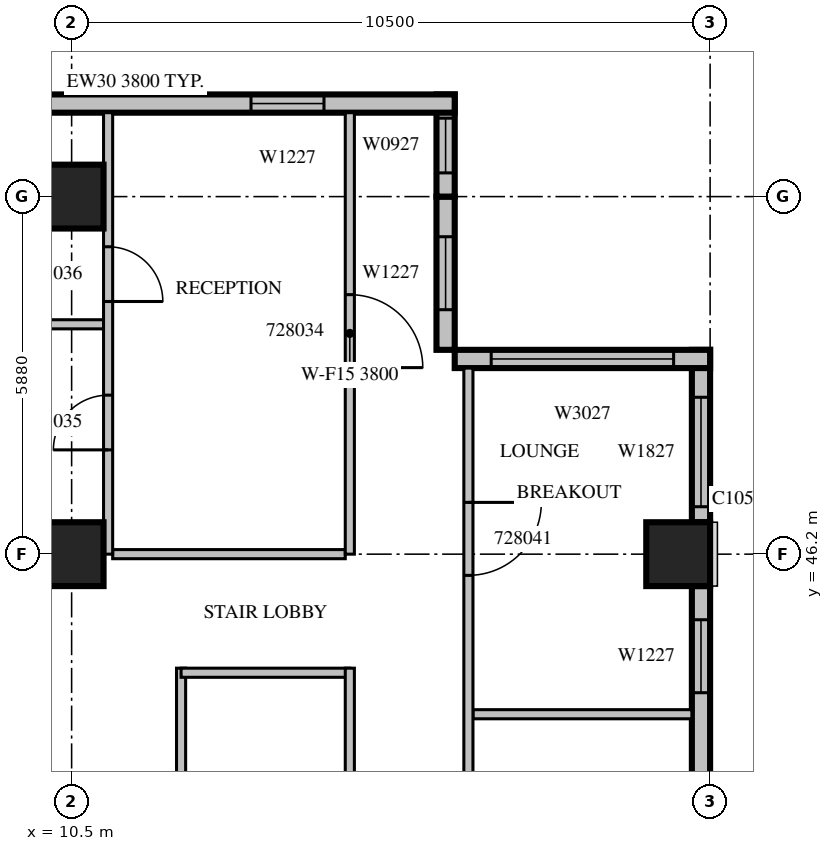
"""IFC4 building model, lengths in metres.
Left out: names, types, materials, properties, quantities, classifications, styles, units other than length and angle.
Written with IfcOpenShell. Run it as: python <this file> out.ifc"""

import sys

from ifc_helpers import new_model, si_unit, direction, frame, frame_2d, origin, origin_2d, place, context, subcontext, project, spatial, rectangle, extrude, source, transform, mapped, element, fill, save


model = new_model("IFC4")
c1 = context("Model", 3, precision=1e-05, world=origin(), true_north=direction((0.0, 1.0)))
c2 = subcontext(c1, "Body", "Model", "MODEL_VIEW")
j1 = project(units=[si_unit("LENGTHUNIT", "METRE"), si_unit("PLANEANGLEUNIT", "RADIAN")], contexts=[c1])
p1 = place(None, origin())
s1 = spatial("IfcSite", under=j1, at=p1, CompositionType="ELEMENT")
p2 = place(p1, origin())
s2 = spatial("IfcBuilding", under=s1, at=p2, CompositionType="ELEMENT")
p3 = place(p2, frame((0.0, 0.0, 128.7)))
s3 = spatial("IfcBuildingStorey", under=s2, at=p3, CompositionType="ELEMENT", Elevation=128.7)
m1 = source(origin(), c2, "Body", "SweptSolid", [
    extrude(rectangle(XDim=1.05, YDim=1.05, at=origin_2d()), origin(), (0.0, 0.0, 1.0), 4.2),
])
for number, where, z_axis, x_axis in (
    (1, (10.5, 46.2, 0.0), (0.0, 0.0, 1.0), (1.0, 0.0, 0.0)),
    (2, (20.475, 46.2, 0.0), (0.0, 0.0, 1.0), (1.0, 0.0, 0.0)),
    (3, (10.5, 52.08, 0.0), (0.0, 0.0, 1.0), (1.0, 0.0, 0.0)),
):
    element("IfcColumn", number, at=place(p3, frame(where, z_axis=z_axis, x_axis=x_axis)), inside=s3, PredefinedType="COLUMN", context=c2, shape_type="MappedRepresentation", body=[
        mapped(m1, transform((0.0, 0.0, 0.0), scale=1.0)),
    ])
m2 = source(origin(), c2, "Body", "SweptSolid", [
    extrude(rectangle(XDim=7.35, YDim=0.3, at=frame_2d((3.675, 0.0))), origin(), (0.0, 0.0, 1.0), 3.8),
])
p4 = place(p3, frame((20.85, 38.325, 0.0), z_axis=(0.0, 0.0, 1.0), x_axis=(0.0, 1.0, 0.0)))
e4 = element("IfcWall", 4, at=p4, inside=s3, PredefinedType="STANDARD", context=c2, shape_type="MappedRepresentation", body=[
    mapped(m2, transform((0.0, 0.0, 0.0), scale=1.0)),
])
m3 = source(origin(), c2, "Body", "SweptSolid", [
    extrude(rectangle(XDim=2.4, YDim=2.7, at=frame_2d((1.2, 1.35))), frame((0.0, 0.16, 0.0), z_axis=(0.0, -1.0, 0.0), x_axis=(1.0, 0.0, 0.0)), (0.0, 0.0, 1.0), 0.32),
])
p5 = place(p4, frame((0.375, 0.0, 0.6)))
e5 = element("IfcOpeningElement", 5, at=p5, cuts=e4, PredefinedType="OPENING", context=c2, shape_type="MappedRepresentation", body=[
    mapped(m3, transform((0.0, 0.0, 0.0), scale=1.0)),
])
m4 = source(origin(), c2, "Body", "SweptSolid", [
    extrude(rectangle(XDim=1.2, YDim=2.7, at=frame_2d((0.6, 1.35))), frame((0.0, 0.16, 0.0), z_axis=(0.0, -1.0, 0.0), x_axis=(1.0, 0.0, 0.0)), (0.0, 0.0, 1.0), 0.32),
])
p6 = place(p4, frame((5.596, 0.0, 0.6)))
e6 = element("IfcOpeningElement", 6, at=p6, cuts=e4, PredefinedType="OPENING", context=c2, shape_type="MappedRepresentation", body=[
    mapped(m4, transform((0.0, 0.0, 0.0), scale=1.0)),
])
m5 = source(origin(), c2, "Body", "SweptSolid", [
    extrude(rectangle(XDim=2.835, YDim=0.3, at=frame_2d((1.417, 0.0))), origin(), (0.0, 0.0, 1.0), 3.8),
])
p7 = place(p3, frame((20.85, 46.725, 0.0), z_axis=(0.0, 0.0, 1.0), x_axis=(0.0, 1.0, 0.0)))
e7 = element("IfcWall", 7, at=p7, inside=s3, PredefinedType="STANDARD", context=c2, shape_type="MappedRepresentation", body=[
    mapped(m5, transform((0.0, 0.0, 0.0), scale=1.0)),
])
m6 = source(origin(), c2, "Body", "SweptSolid", [
    extrude(rectangle(XDim=1.8, YDim=2.7, at=frame_2d((0.9, 1.35))), frame((0.0, 0.16, 0.0), z_axis=(0.0, -1.0, 0.0), x_axis=(1.0, 0.0, 0.0)), (0.0, 0.0, 1.0), 0.32),
])
p8 = place(p7, frame((0.255, 0.0, 0.6)))
e8 = element("IfcOpeningElement", 8, at=p8, cuts=e7, PredefinedType="OPENING", context=c2, shape_type="MappedRepresentation", body=[
    mapped(m6, transform((0.0, 0.0, 0.0), scale=1.0)),
])
m7 = source(origin(), c2, "Body", "SweptSolid", [
    extrude(rectangle(XDim=4.2, YDim=0.3, at=frame_2d((2.1, 0.0))), origin(), (0.0, 0.0, 1.0), 3.8),
])
p9 = place(p3, frame((21.0, 49.41, 0.0), z_axis=(0.0, 0.0, 1.0), x_axis=(-1.0, 0.0, 0.0)))
e9 = element("IfcWall", 9, at=p9, inside=s3, PredefinedType="STANDARD", context=c2, shape_type="MappedRepresentation", body=[
    mapped(m7, transform((0.0, 0.0, 0.0), scale=1.0)),
])
m8 = source(origin(), c2, "Body", "SweptSolid", [
    extrude(rectangle(XDim=3.0, YDim=2.7, at=frame_2d((1.5, 1.35))), frame((0.0, 0.16, 0.0), z_axis=(0.0, -1.0, 0.0), x_axis=(1.0, 0.0, 0.0)), (0.0, 0.0, 1.0), 0.32),
])
p10 = place(p9, frame((0.6, 0.0, 0.6)))
e10 = element("IfcOpeningElement", 10, at=p10, cuts=e9, PredefinedType="OPENING", context=c2, shape_type="MappedRepresentation", body=[
    mapped(m8, transform((0.0, 0.0, 0.0), scale=1.0)),
])
m9 = source(origin(), c2, "Body", "SweptSolid", [
    extrude(rectangle(XDim=2.52, YDim=0.3, at=frame_2d((1.26, 0.0))), origin(), (0.0, 0.0, 1.0), 3.8),
])
p11 = place(p3, frame((16.65, 49.56, 0.0), z_axis=(0.0, 0.0, 1.0), x_axis=(0.0, 1.0, 0.0)))
e11 = element("IfcWall", 11, at=p11, inside=s3, PredefinedType="STANDARD", context=c2, shape_type="MappedRepresentation", body=[
    mapped(m9, transform((0.0, 0.0, 0.0), scale=1.0)),
])
p12 = place(p11, frame((0.66, 0.0, 0.6)))
e12 = element("IfcOpeningElement", 12, at=p12, cuts=e11, PredefinedType="OPENING", context=c2, shape_type="MappedRepresentation", body=[
    mapped(m4, transform((0.0, 0.0, 0.0), scale=1.0)),
])
m10 = source(origin(), c2, "Body", "SweptSolid", [
    extrude(rectangle(XDim=1.68, YDim=0.3, at=frame_2d((0.84, 0.0))), origin(), (0.0, 0.0, 1.0), 3.8),
])
p13 = place(p3, frame((16.65, 52.08, 0.0), z_axis=(0.0, 0.0, 1.0), x_axis=(0.0, 1.0, 0.0)))
e13 = element("IfcWall", 13, at=p13, inside=s3, PredefinedType="STANDARD", context=c2, shape_type="MappedRepresentation", body=[
    mapped(m10, transform((0.0, 0.0, 0.0), scale=1.0)),
])
m11 = source(origin(), c2, "Body", "SweptSolid", [
    extrude(rectangle(XDim=0.9, YDim=2.7, at=frame_2d((0.45, 1.35))), frame((0.0, 0.16, 0.0), z_axis=(0.0, -1.0, 0.0), x_axis=(1.0, 0.0, 0.0)), (0.0, 0.0, 1.0), 0.32),
])
p14 = place(p13, frame((0.39, 0.0, 0.6)))
e14 = element("IfcOpeningElement", 14, at=p14, cuts=e13, PredefinedType="OPENING", context=c2, shape_type="MappedRepresentation", body=[
    mapped(m11, transform((0.0, 0.0, 0.0), scale=1.0)),
])
m12 = source(origin(), c2, "Body", "SweptSolid", [
    extrude(rectangle(XDim=10.5, YDim=0.3, at=frame_2d((5.25, 0.0))), origin(), (0.0, 0.0, 1.0), 3.8),
])
p15 = place(p3, frame((16.8, 53.61, 0.0), z_axis=(0.0, 0.0, 1.0), x_axis=(-1.0, 0.0, 0.0)))
e15 = element("IfcWall", 15, at=p15, inside=s3, PredefinedType="STANDARD", context=c2, shape_type="MappedRepresentation", body=[
    mapped(m12, transform((0.0, 0.0, 0.0), scale=1.0)),
])
p16 = place(p15, frame((2.15, 0.0, 0.6)))
e16 = element("IfcOpeningElement", 16, at=p16, cuts=e15, PredefinedType="OPENING", context=c2, shape_type="MappedRepresentation", body=[
    mapped(m4, transform((0.0, 0.0, 0.0), scale=1.0)),
])
p17 = place(p15, frame((8.025, 0.0, 0.6)))
e17 = element("IfcOpeningElement", 17, at=p17, cuts=e15, PredefinedType="OPENING", context=c2, shape_type="MappedRepresentation", body=[
    mapped(m6, transform((0.0, 0.0, 0.0), scale=1.0)),
])
m13 = source(origin(), c2, "Body", "SweptSolid", [
    extrude(rectangle(XDim=6.45, YDim=0.15, at=frame_2d((3.225, 0.0))), origin(), (0.0, 0.0, 1.0), 3.8),
])
p18 = place(p3, frame((12.3, 44.325, 0.0), z_axis=(0.0, 0.0, 1.0), x_axis=(0.0, -1.0, 0.0)))
e18 = element("IfcWall", 18, at=p18, inside=s3, PredefinedType="PARTITIONING", context=c2, shape_type="MappedRepresentation", body=[
    mapped(m13, transform((0.0, 0.0, 0.0), scale=1.0)),
])
m14 = source(origin(), c2, "Body", "SweptSolid", [
    extrude(rectangle(XDim=2.775, YDim=0.15, at=frame_2d((1.387, 0.0))), origin(), (0.0, 0.0, 1.0), 3.8),
])
p19 = place(p3, frame((15.075, 44.25, 0.0), z_axis=(0.0, 0.0, 1.0), x_axis=(-1.0, 0.0, 0.0)))
e19 = element("IfcWall", 19, at=p19, inside=s3, PredefinedType="PARTITIONING", context=c2, shape_type="MappedRepresentation", body=[
    mapped(m14, transform((0.0, 0.0, 0.0), scale=1.0)),
])
p20 = place(p3, frame((15.075, 37.875, 0.0), z_axis=(0.0, 0.0, 1.0), x_axis=(0.0, 1.0, 0.0)))
e20 = element("IfcWall", 20, at=p20, inside=s3, PredefinedType="PARTITIONING", context=c2, shape_type="MappedRepresentation", body=[
    mapped(m13, transform((0.0, 0.0, 0.0), scale=1.0)),
])
m15 = source(origin(), c2, "Body", "SweptSolid", [
    extrude(rectangle(XDim=0.9, YDim=2.1, at=frame_2d((0.45, 1.05))), frame((0.0, 0.085, 0.0), z_axis=(0.0, -1.0, 0.0), x_axis=(1.0, 0.0, 0.0)), (0.0, 0.0, 1.0), 0.17),
])
p21 = place(p20, frame((2.737, 0.0, 0.0)))
e21 = element("IfcOpeningElement", 21, at=p21, cuts=e20, PredefinedType="OPENING", context=c2, shape_type="MappedRepresentation", body=[
    mapped(m15, transform((0.0, 0.0, 0.0), scale=1.0)),
])
m16 = source(origin(), c2, "Body", "SweptSolid", [
    extrude(rectangle(XDim=4.52, YDim=0.15, at=frame_2d((2.26, 0.0))), origin(), (0.0, 0.0, 1.0), 3.8),
])
p22 = place(p3, frame((11.025, 49.98, 0.0), z_axis=(0.0, 0.0, 1.0), x_axis=(-1.0, 0.0, 0.0)))
e22 = element("IfcWall", 22, at=p22, inside=s3, PredefinedType="PARTITIONING", context=c2, shape_type="MappedRepresentation", body=[
    mapped(m16, transform((0.0, 0.0, 0.0), scale=1.0)),
])
m17 = source(origin(), c2, "Body", "SweptSolid", [
    extrude(rectangle(XDim=3.825, YDim=0.15, at=frame_2d((1.913, 0.0))), origin(), (0.0, 0.0, 1.0), 3.8),
])
p23 = place(p3, frame((15.0, 46.2, 0.0), z_axis=(0.0, 0.0, 1.0), x_axis=(-1.0, 0.0, 0.0)))
e23 = element("IfcWall", 23, at=p23, inside=s3, PredefinedType="PARTITIONING", context=c2, shape_type="MappedRepresentation", body=[
    mapped(m17, transform((0.0, 0.0, 0.0), scale=1.0)),
])
m18 = source(origin(), c2, "Body", "SweptSolid", [
    extrude(rectangle(XDim=7.26, YDim=0.15, at=frame_2d((3.63, 0.0))), origin(), (0.0, 0.0, 1.0), 3.8),
])
p24 = place(p3, frame((11.1, 46.2, 0.0), z_axis=(0.0, 0.0, 1.0), x_axis=(0.0, 1.0, 0.0)))
e24 = element("IfcWall", 24, at=p24, inside=s3, PredefinedType="PARTITIONING", context=c2, shape_type="MappedRepresentation", body=[
    mapped(m18, transform((0.0, 0.0, 0.0), scale=1.0)),
])
p25 = place(p24, frame((1.715, 0.0, 0.0)))
e25 = element("IfcOpeningElement", 25, at=p25, cuts=e24, PredefinedType="OPENING", context=c2, shape_type="MappedRepresentation", body=[
    mapped(m15, transform((0.0, 0.0, 0.0), scale=1.0)),
])
p26 = place(p24, frame((4.155, 0.0, 0.0)))
e26 = element("IfcOpeningElement", 26, at=p26, cuts=e24, PredefinedType="OPENING", context=c2, shape_type="MappedRepresentation", body=[
    mapped(m15, transform((0.0, 0.0, 0.0), scale=1.0)),
])
m19 = source(origin(), c2, "Body", "SweptSolid", [
    extrude(rectangle(XDim=3.6, YDim=0.15, at=frame_2d((1.8, 0.0))), origin(), (0.0, 0.0, 1.0), 3.8),
])
p27 = place(p3, frame((17.1, 43.568, 0.0), z_axis=(0.0, 0.0, 1.0), x_axis=(1.0, 0.0, 0.0)))
e27 = element("IfcWall", 27, at=p27, inside=s3, PredefinedType="PARTITIONING", context=c2, shape_type="MappedRepresentation", body=[
    mapped(m19, transform((0.0, 0.0, 0.0), scale=1.0)),
])
p28 = place(p3, frame((15.075, 46.2, 0.0), z_axis=(0.0, 0.0, 1.0), x_axis=(0.0, 1.0, 0.0)))
e28 = element("IfcWall", 28, at=p28, inside=s3, PredefinedType="PARTITIONING", context=c2, shape_type="MappedRepresentation", body=[
    mapped(m18, transform((0.0, 0.0, 0.0), scale=1.0)),
])
m20 = source(origin(), c2, "Body", "SweptSolid", [
    extrude(rectangle(XDim=1.2, YDim=2.1, at=frame_2d((0.6, 1.05))), frame((0.0, 0.085, 0.0), z_axis=(0.0, -1.0, 0.0), x_axis=(1.0, 0.0, 0.0)), (0.0, 0.0, 1.0), 0.17),
])
p29 = place(p28, frame((3.067, 0.0, 0.0)))
e29 = element("IfcOpeningElement", 29, at=p29, cuts=e28, PredefinedType="OPENING", context=c2, shape_type="MappedRepresentation", body=[
    mapped(m20, transform((0.0, 0.0, 0.0), scale=1.0)),
])
m21 = source(origin(), c2, "Body", "SweptSolid", [
    extrude(rectangle(XDim=19.86, YDim=0.15, at=frame_2d((9.93, 0.0))), origin(), (0.0, 0.0, 1.0), 3.3),
])
p30 = place(p3, frame((17.025, 49.26, 0.0), z_axis=(0.0, 0.0, 1.0), x_axis=(0.0, -1.0, 0.0)))
e30 = element("IfcWall", 30, at=p30, inside=s3, PredefinedType="PARTITIONING", context=c2, shape_type="MappedRepresentation", body=[
    mapped(m21, transform((0.0, 0.0, 0.0), scale=1.0)),
])
m22 = source(origin(), c2, "Body", "SweptSolid", [
    extrude(rectangle(XDim=1.0, YDim=2.1, at=frame_2d((0.5, 1.05))), frame((0.0, 0.085, 0.0), z_axis=(0.0, -1.0, 0.0), x_axis=(1.0, 0.0, 0.0)), (0.0, 0.0, 1.0), 0.17),
])
p31 = place(p30, frame((17.503, 0.0, 0.0)))
e31 = element("IfcOpeningElement", 31, at=p31, cuts=e30, PredefinedType="OPENING", context=c2, shape_type="MappedRepresentation", body=[
    mapped(m22, transform((0.0, 0.0, 0.0), scale=1.0)),
])
p32 = place(p30, frame((14.191, 0.0, 0.0)))
e32 = element("IfcOpeningElement", 32, at=p32, cuts=e30, PredefinedType="OPENING", context=c2, shape_type="MappedRepresentation", body=[
    mapped(m22, transform((0.0, 0.0, 0.0), scale=1.0)),
])
p33 = place(p30, frame((11.848, 0.0, 0.0)))
e33 = element("IfcOpeningElement", 33, at=p33, cuts=e30, PredefinedType="OPENING", context=c2, shape_type="MappedRepresentation", body=[
    mapped(m22, transform((0.0, 0.0, 0.0), scale=1.0)),
])
p34 = place(p30, frame((7.976, 0.0, 0.0)))
e34 = element("IfcOpeningElement", 34, at=p34, cuts=e30, PredefinedType="OPENING", context=c2, shape_type="MappedRepresentation", body=[
    mapped(m20, transform((0.0, 0.0, 0.0), scale=1.0)),
])
p35 = place(p30, frame((2.209, 0.0, 0.0)))
e35 = element("IfcOpeningElement", 35, at=p35, cuts=e30, PredefinedType="OPENING", context=c2, shape_type="MappedRepresentation", body=[
    mapped(m20, transform((0.0, 0.0, 0.0), scale=1.0)),
])
m23 = source(origin(), c2, "Body", "SweptSolid", [
    extrude(rectangle(XDim=1.2, YDim=2.7, at=frame_2d((0.6, 1.35))), frame((0.0, 0.03, 0.0), z_axis=(0.0, -1.0, 0.0), x_axis=(1.0, 0.0, 0.0)), (0.0, 0.0, 1.0), 0.06),
])
p36 = place(p6, origin())
e36 = element("IfcWindow", 36, at=p36, inside=s3, PartitioningType="SINGLE_PANEL", PredefinedType="WINDOW", context=c2, shape_type="MappedRepresentation", body=[
    mapped(m23, transform((0.0, 0.0, 0.0), scale=1.0)),
])
fill(e6, e36)
m24 = source(origin(), c2, "Body", "SweptSolid", [
    extrude(rectangle(XDim=1.8, YDim=2.7, at=frame_2d((0.9, 1.35))), frame((0.0, 0.03, 0.0), z_axis=(0.0, -1.0, 0.0), x_axis=(1.0, 0.0, 0.0)), (0.0, 0.0, 1.0), 0.06),
])
p37 = place(p8, origin())
e37 = element("IfcWindow", 37, at=p37, inside=s3, PartitioningType="SINGLE_PANEL", PredefinedType="WINDOW", context=c2, shape_type="MappedRepresentation", body=[
    mapped(m24, transform((0.0, 0.0, 0.0), scale=1.0)),
])
fill(e8, e37)
m25 = source(origin(), c2, "Body", "SweptSolid", [
    extrude(rectangle(XDim=3.0, YDim=2.7, at=frame_2d((1.5, 1.35))), frame((0.0, 0.03, 0.0), z_axis=(0.0, -1.0, 0.0), x_axis=(1.0, 0.0, 0.0)), (0.0, 0.0, 1.0), 0.06),
])
p38 = place(p10, origin())
e38 = element("IfcWindow", 38, at=p38, inside=s3, PartitioningType="SINGLE_PANEL", PredefinedType="WINDOW", context=c2, shape_type="MappedRepresentation", body=[
    mapped(m25, transform((0.0, 0.0, 0.0), scale=1.0)),
])
fill(e10, e38)
p39 = place(p12, origin())
e39 = element("IfcWindow", 39, at=p39, inside=s3, PartitioningType="SINGLE_PANEL", PredefinedType="WINDOW", context=c2, shape_type="MappedRepresentation", body=[
    mapped(m23, transform((0.0, 0.0, 0.0), scale=1.0)),
])
fill(e12, e39)
m26 = source(origin(), c2, "Body", "SweptSolid", [
    extrude(rectangle(XDim=0.9, YDim=2.7, at=frame_2d((0.45, 1.35))), frame((0.0, 0.03, 0.0), z_axis=(0.0, -1.0, 0.0), x_axis=(1.0, 0.0, 0.0)), (0.0, 0.0, 1.0), 0.06),
])
p40 = place(p14, origin())
e40 = element("IfcWindow", 40, at=p40, inside=s3, PartitioningType="SINGLE_PANEL", PredefinedType="WINDOW", context=c2, shape_type="MappedRepresentation", body=[
    mapped(m26, transform((0.0, 0.0, 0.0), scale=1.0)),
])
fill(e14, e40)
p41 = place(p16, origin())
e41 = element("IfcWindow", 41, at=p41, inside=s3, PartitioningType="SINGLE_PANEL", PredefinedType="WINDOW", context=c2, shape_type="MappedRepresentation", body=[
    mapped(m23, transform((0.0, 0.0, 0.0), scale=1.0)),
])
fill(e16, e41)
m27 = source(origin(), c2, "Body", "SweptSolid", [
    extrude(rectangle(XDim=1.2, YDim=2.1, at=frame_2d((0.6, 1.05))), frame((0.0, 0.025, 0.0), z_axis=(0.0, -1.0, 0.0), x_axis=(1.0, 0.0, 0.0)), (0.0, 0.0, 1.0), 0.05),
])
p42 = place(p29, origin())
e42 = element("IfcDoor", 42, at=p42, inside=s3, OperationType="SINGLE_SWING_RIGHT", PredefinedType="DOOR", context=c2, shape_type="MappedRepresentation", body=[
    mapped(m27, transform((0.0, 0.0, 0.0), scale=1.0)),
])
fill(e29, e42)
m28 = source(origin(), c2, "Body", "SweptSolid", [
    extrude(rectangle(XDim=0.9, YDim=2.1, at=frame_2d((0.45, 1.05))), frame((0.0, 0.025, 0.0), z_axis=(0.0, -1.0, 0.0), x_axis=(1.0, 0.0, 0.0)), (0.0, 0.0, 1.0), 0.05),
])
p43 = place(p25, origin())
e43 = element("IfcDoor", 43, at=p43, inside=s3, OperationType="SINGLE_SWING_LEFT", PredefinedType="DOOR", context=c2, shape_type="MappedRepresentation", body=[
    mapped(m28, transform((0.0, 0.0, 0.0), scale=1.0)),
])
fill(e25, e43)
p44 = place(p26, origin())
e44 = element("IfcDoor", 44, at=p44, inside=s3, OperationType="SINGLE_SWING_RIGHT", PredefinedType="DOOR", context=c2, shape_type="MappedRepresentation", body=[
    mapped(m28, transform((0.0, 0.0, 0.0), scale=1.0)),
])
fill(e26, e44)
p45 = place(p35, origin())
e45 = element("IfcDoor", 45, at=p45, inside=s3, OperationType="SINGLE_SWING_LEFT", PredefinedType="DOOR", context=c2, shape_type="MappedRepresentation", body=[
    mapped(m27, transform((0.0, 0.0, 0.0), scale=1.0)),
])
fill(e35, e45)
save(model, sys.argv[1])
